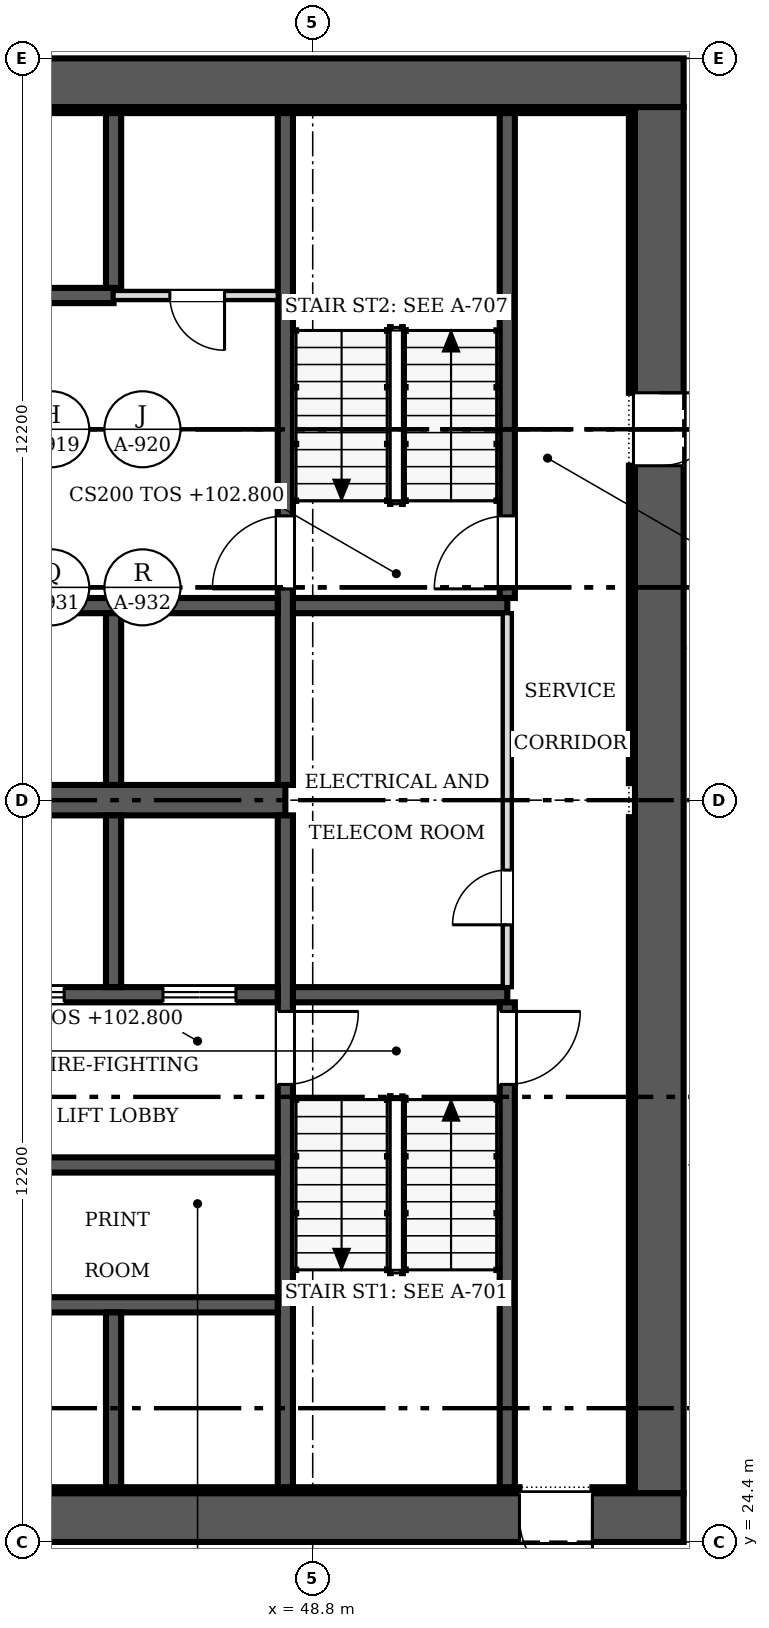
"""IFC4 building model, lengths in metres.
Left out: names, types, materials, properties, quantities, classifications, styles, units other than length and angle.
Written with IfcOpenShell. Run it as: python <this file> out.ifc"""

import sys

from ifc_helpers import new_model, si_unit, direction, frame, frame_2d, origin, place, context, subcontext, project, spatial, rectangle, extrude, source, transform, mapped, element, fill, save


model = new_model("IFC4")
c1 = context("Model", 3, precision=1e-05, world=origin(), true_north=direction((0.0, 1.0)))
c2 = subcontext(c1, "Body", "Model", "MODEL_VIEW")
j1 = project(units=[si_unit("LENGTHUNIT", "METRE"), si_unit("PLANEANGLEUNIT", "RADIAN")], contexts=[c1])
p1 = place(None, origin())
s1 = spatial("IfcSite", under=j1, at=p1, CompositionType="ELEMENT")
p2 = place(p1, origin())
s2 = spatial("IfcBuilding", under=s1, at=p2, CompositionType="ELEMENT")
p3 = place(p2, frame((0.0, 0.0, 102.8)))
s3 = spatial("IfcBuildingStorey", under=s2, at=p3, CompositionType="ELEMENT", Elevation=102.8)
p4 = place(p3, frame((54.9, 24.8, 0.0), z_axis=(0.0, 0.0, 1.0), x_axis=(-1.0, 0.0, 0.0)))
e1 = element("IfcWall", 1, at=p4, inside=s3, PredefinedType="SHEAR", context=c2, shape_type="SweptSolid", body=[
    extrude(rectangle(XDim=24.4, YDim=0.8, at=frame_2d((12.2, 0.0))), origin(), (0.0, 0.0, 1.0), 3.8),
])
m1 = source(origin(), c2, "Body", "SweptSolid", [
    extrude(rectangle(XDim=1.2, YDim=2.1, at=frame_2d((0.6, 1.05))), frame((0.0, 0.41, 0.0), z_axis=(0.0, -1.0, 0.0), x_axis=(1.0, 0.0, 0.0)), (0.0, 0.0, 1.0), 0.82),
])
p5 = place(p4, frame((1.5, 0.0, 0.0)))
e2 = element("IfcOpeningElement", 2, at=p5, cuts=e1, PredefinedType="OPENING", context=c2, shape_type="MappedRepresentation", body=[
    mapped(m1, transform((0.0, 0.0, 0.0), scale=1.0)),
])
p6 = place(p3, frame((30.5, 48.4, 0.0), z_axis=(0.0, 0.0, 1.0), x_axis=(1.0, 0.0, 0.0)))
e3 = element("IfcWall", 3, at=p6, inside=s3, PredefinedType="SHEAR", context=c2, shape_type="SweptSolid", body=[
    extrude(rectangle(XDim=24.4, YDim=0.8, at=frame_2d((12.2, 0.0))), origin(), (0.0, 0.0, 1.0), 3.8),
])
p7 = place(p3, frame((54.5, 48.0, 0.0), z_axis=(0.0, 0.0, 1.0), x_axis=(0.0, -1.0, 0.0)))
e4 = element("IfcWall", 4, at=p7, inside=s3, PredefinedType="SHEAR", context=c2, shape_type="SweptSolid", body=[
    extrude(rectangle(XDim=22.8, YDim=0.8, at=frame_2d((11.4, 0.0))), origin(), (0.0, 0.0, 1.0), 3.8),
])
p8 = place(p7, frame((4.7, 0.0, 0.0)))
e5 = element("IfcOpeningElement", 5, at=p8, cuts=e4, PredefinedType="OPENING", context=c2, shape_type="MappedRepresentation", body=[
    mapped(m1, transform((0.0, 0.0, 0.0), scale=1.0)),
])
p9 = place(p3, frame((31.3, 25.25, 0.0), z_axis=(0.0, 0.0, 1.0), x_axis=(1.0, 0.0, 0.0)))
e6 = element("IfcWall", 6, at=p9, inside=s3, PredefinedType="SOLIDWALL", context=c2, shape_type="SweptSolid", body=[
    extrude(rectangle(XDim=20.9, YDim=0.1, at=frame_2d((10.45, 0.0))), origin(), (0.0, 0.0, 1.0), 3.8),
])
p10 = place(p3, frame((53.4, 25.25, 0.0), z_axis=(0.0, 0.0, 1.0), x_axis=(1.0, 0.0, 0.0)))
e7 = element("IfcWall", 7, at=p10, inside=s3, PredefinedType="SOLIDWALL", context=c2, shape_type="SweptSolid", body=[
    extrude(rectangle(XDim=0.7, YDim=0.1, at=frame_2d((0.35, 0.0))), origin(), (0.0, 0.0, 1.0), 3.8),
])
p11 = place(p3, frame((31.3, 47.95, 0.0), z_axis=(0.0, 0.0, 1.0), x_axis=(1.0, 0.0, 0.0)))
e8 = element("IfcWall", 8, at=p11, inside=s3, PredefinedType="SOLIDWALL", context=c2, shape_type="SweptSolid", body=[
    extrude(rectangle(XDim=22.8, YDim=0.1, at=frame_2d((11.4, 0.0))), origin(), (0.0, 0.0, 1.0), 3.8),
])
p12 = place(p3, frame((54.05, 25.3, 0.0), z_axis=(0.0, 0.0, 1.0), x_axis=(0.0, 1.0, 0.0)))
e9 = element("IfcWall", 9, at=p12, inside=s3, PredefinedType="SOLIDWALL", context=c2, shape_type="SweptSolid", body=[
    extrude(rectangle(XDim=11.02, YDim=0.1, at=frame_2d((5.51, 0.0))), origin(), (0.0, 0.0, 1.0), 3.8),
])
p13 = place(p3, frame((54.05, 36.88, 0.0), z_axis=(0.0, 0.0, 1.0), x_axis=(0.0, 1.0, 0.0)))
e10 = element("IfcWall", 10, at=p13, inside=s3, PredefinedType="SOLIDWALL", context=c2, shape_type="SweptSolid", body=[
    extrude(rectangle(XDim=5.22, YDim=0.1, at=frame_2d((2.61, 0.0))), origin(), (0.0, 0.0, 1.0), 3.8),
])
p14 = place(p3, frame((54.05, 43.3, 0.0), z_axis=(0.0, 0.0, 1.0), x_axis=(0.0, 1.0, 0.0)))
e11 = element("IfcWall", 11, at=p14, inside=s3, PredefinedType="SOLIDWALL", context=c2, shape_type="SweptSolid", body=[
    extrude(rectangle(XDim=4.6, YDim=0.1, at=frame_2d((2.3, 0.0))), origin(), (0.0, 0.0, 1.0), 3.8),
])
p15 = place(p3, frame((31.4, 36.6, 0.0), z_axis=(0.0, 0.0, 1.0), x_axis=(1.0, 0.0, 0.0)))
e12 = element("IfcWall", 12, at=p15, inside=s3, PredefinedType="SHEAR", context=c2, shape_type="SweptSolid", body=[
    extrude(rectangle(XDim=16.95, YDim=0.5, at=frame_2d((8.475, 0.0))), origin(), (0.0, 0.0, 1.0), 3.8),
])
p16 = place(p3, frame((48.35, 36.35, 0.0), z_axis=(0.0, 0.0, 1.0), x_axis=(0.0, -1.0, 0.0)))
e13 = element("IfcWall", 13, at=p16, inside=s3, PredefinedType="SOLIDWALL", context=c2, shape_type="SweptSolid", body=[
    extrude(rectangle(XDim=11.05, YDim=0.25, at=frame_2d((5.525, 0.0))), origin(), (0.0, 0.0, 1.0), 3.8),
])
m2 = source(origin(), c2, "Body", "SweptSolid", [
    extrude(rectangle(XDim=1.2, YDim=2.1, at=frame_2d((0.6, 1.05))), frame((0.0, 0.135, 0.0), z_axis=(0.0, -1.0, 0.0), x_axis=(1.0, 0.0, 0.0)), (0.0, 0.0, 1.0), 0.27),
])
p17 = place(p16, frame((3.225, 0.0, 0.0)))
e14 = element("IfcOpeningElement", 14, at=p17, cuts=e13, PredefinedType="OPENING", context=c2, shape_type="MappedRepresentation", body=[
    mapped(m2, transform((0.0, 0.0, 0.0), scale=1.0)),
])
p18 = place(p3, frame((48.35, 47.9, 0.0), z_axis=(0.0, 0.0, 1.0), x_axis=(0.0, -1.0, 0.0)))
e15 = element("IfcWall", 15, at=p18, inside=s3, PredefinedType="SOLIDWALL", context=c2, shape_type="SweptSolid", body=[
    extrude(rectangle(XDim=11.05, YDim=0.25, at=frame_2d((5.525, 0.0))), origin(), (0.0, 0.0, 1.0), 3.8),
])
p19 = place(p18, frame((6.625, 0.0, 0.0)))
e16 = element("IfcOpeningElement", 16, at=p19, cuts=e15, PredefinedType="OPENING", context=c2, shape_type="MappedRepresentation", body=[
    mapped(m2, transform((0.0, 0.0, 0.0), scale=1.0)),
])
p20 = place(p3, frame((48.225, 33.4, 0.0), z_axis=(0.0, 0.0, 1.0), x_axis=(-1.0, 0.0, 0.0)))
e17 = element("IfcWall", 17, at=p20, inside=s3, PredefinedType="SOLIDWALL", context=c2, shape_type="SweptSolid", body=[
    extrude(rectangle(XDim=5.275, YDim=0.25, at=frame_2d((2.638, 0.0))), origin(), (0.0, 0.0, 1.0), 3.8),
])
p21 = place(p20, frame((3.512, 0.0, 0.0)))
e18 = element("IfcOpeningElement", 18, at=p21, cuts=e17, PredefinedType="OPENING", context=c2, shape_type="MappedRepresentation", body=[
    mapped(m2, transform((0.0, 0.0, 0.0), scale=1.0)),
])
p22 = place(p20, frame((0.688, 0.0, 0.0)))
e19 = element("IfcOpeningElement", 19, at=p22, cuts=e17, PredefinedType="OPENING", context=c2, shape_type="MappedRepresentation", body=[
    mapped(m2, transform((0.0, 0.0, 0.0), scale=1.0)),
])
p23 = place(p3, frame((48.475, 33.4, 0.0), z_axis=(0.0, 0.0, 1.0), x_axis=(1.0, 0.0, 0.0)))
e20 = element("IfcWall", 20, at=p23, inside=s3, PredefinedType="SOLIDWALL", context=c2, shape_type="SweptSolid", body=[
    extrude(rectangle(XDim=3.525, YDim=0.25, at=frame_2d((1.762, 0.0))), origin(), (0.0, 0.0, 1.0), 3.8),
])
p24 = place(p3, frame((42.95, 39.8, 0.0), z_axis=(0.0, 0.0, 1.0), x_axis=(1.0, 0.0, 0.0)))
e21 = element("IfcWall", 21, at=p24, inside=s3, PredefinedType="SOLIDWALL", context=c2, shape_type="SweptSolid", body=[
    extrude(rectangle(XDim=5.275, YDim=0.25, at=frame_2d((2.638, 0.0))), origin(), (0.0, 0.0, 1.0), 3.8),
])
p25 = place(p3, frame((48.475, 39.8, 0.0), z_axis=(0.0, 0.0, 1.0), x_axis=(1.0, 0.0, 0.0)))
e22 = element("IfcWall", 22, at=p25, inside=s3, PredefinedType="SOLIDWALL", context=c2, shape_type="SweptSolid", body=[
    extrude(rectangle(XDim=3.525, YDim=0.25, at=frame_2d((1.762, 0.0))), origin(), (0.0, 0.0, 1.0), 3.8),
])
p26 = place(p3, frame((42.95, 28.3, 0.0), z_axis=(0.0, 0.0, 1.0), x_axis=(1.0, 0.0, 0.0)))
e23 = element("IfcWall", 23, at=p26, inside=s3, PredefinedType="SOLIDWALL", context=c2, shape_type="SweptSolid", body=[
    extrude(rectangle(XDim=5.275, YDim=0.25, at=frame_2d((2.638, 0.0))), origin(), (0.0, 0.0, 1.0), 3.8),
])
p27 = place(p3, frame((42.95, 44.9, 0.0), z_axis=(0.0, 0.0, 1.0), x_axis=(1.0, 0.0, 0.0)))
e24 = element("IfcWall", 24, at=p27, inside=s3, PredefinedType="SOLIDWALL", context=c2, shape_type="SweptSolid", body=[
    extrude(rectangle(XDim=2.575, YDim=0.25, at=frame_2d((1.288, 0.0))), origin(), (0.0, 0.0, 1.0), 3.8),
])
p28 = place(p3, frame((52.0, 25.3, 0.0), z_axis=(0.0, 0.0, 1.0), x_axis=(0.0, 1.0, 0.0)))
e25 = element("IfcWall", 25, at=p28, inside=s3, PredefinedType="SOLIDWALL", context=c2, shape_type="SweptSolid", body=[
    extrude(rectangle(XDim=7.975, YDim=0.25, at=frame_2d((3.987, 0.0))), origin(), (0.0, 0.0, 1.0), 3.8),
])
p29 = place(p28, frame((6.625, 0.0, 0.0)))
e26 = element("IfcOpeningElement", 26, at=p29, cuts=e25, PredefinedType="OPENING", context=c2, shape_type="MappedRepresentation", body=[
    mapped(m2, transform((0.0, 0.0, 0.0), scale=1.0)),
])
p30 = place(p3, frame((52.0, 39.925, 0.0), z_axis=(0.0, 0.0, 1.0), x_axis=(0.0, 1.0, 0.0)))
e27 = element("IfcWall", 27, at=p30, inside=s3, PredefinedType="SOLIDWALL", context=c2, shape_type="SweptSolid", body=[
    extrude(rectangle(XDim=7.975, YDim=0.25, at=frame_2d((3.987, 0.0))), origin(), (0.0, 0.0, 1.0), 3.8),
])
p31 = place(p30, frame((0.15, 0.0, 0.0)))
e28 = element("IfcOpeningElement", 28, at=p31, cuts=e27, PredefinedType="OPENING", context=c2, shape_type="MappedRepresentation", body=[
    mapped(m2, transform((0.0, 0.0, 0.0), scale=1.0)),
])
p32 = place(p3, frame((45.525, 33.525, 0.0), z_axis=(0.0, 0.0, 1.0), x_axis=(0.0, 1.0, 0.0)))
e29 = element("IfcWall", 29, at=p32, inside=s3, PredefinedType="SOLIDWALL", context=c2, shape_type="SweptSolid", body=[
    extrude(rectangle(XDim=2.825, YDim=0.25, at=frame_2d((1.413, 0.0))), origin(), (0.0, 0.0, 1.0), 3.8),
])
p33 = place(p3, frame((45.525, 36.85, 0.0), z_axis=(0.0, 0.0, 1.0), x_axis=(0.0, 1.0, 0.0)))
e30 = element("IfcWall", 30, at=p33, inside=s3, PredefinedType="SOLIDWALL", context=c2, shape_type="SweptSolid", body=[
    extrude(rectangle(XDim=2.825, YDim=0.25, at=frame_2d((1.413, 0.0))), origin(), (0.0, 0.0, 1.0), 3.8),
])
p34 = place(p3, frame((42.95, 30.6, 0.0), z_axis=(0.0, 0.0, 1.0), x_axis=(1.0, 0.0, 0.0)))
e31 = element("IfcWall", 31, at=p34, inside=s3, PredefinedType="SOLIDWALL", context=c2, shape_type="SweptSolid", body=[
    extrude(rectangle(XDim=5.275, YDim=0.25, at=frame_2d((2.638, 0.0))), origin(), (0.0, 0.0, 1.0), 3.8),
])
for number, where, z_axis, x_axis in (
    (32, (45.525, 25.3, 0.0), (0.0, 0.0, 1.0), (0.0, 1.0, 0.0)),
    (33, (45.525, 45.025, 0.0), (0.0, 0.0, 1.0), (0.0, 1.0, 0.0)),
):
    element("IfcWall", number, at=place(p3, frame(where, z_axis=z_axis, x_axis=x_axis)), inside=s3, PredefinedType="SOLIDWALL", context=c2, shape_type="SweptSolid", body=[
        extrude(rectangle(XDim=2.875, YDim=0.25, at=frame_2d((1.438, 0.0))), origin(), (0.0, 0.0, 1.0), 3.8),
    ])
p35 = place(p3, frame((52.0, 33.525, 0.0), z_axis=(0.0, 0.0, 1.0), x_axis=(0.0, 1.0, 0.0)))
e34 = element("IfcWall", 34, at=p35, inside=s3, PredefinedType="PARTITIONING", context=c2, shape_type="SweptSolid", body=[
    extrude(rectangle(XDim=6.15, YDim=0.15, at=frame_2d((3.075, 0.0))), origin(), (0.0, 0.0, 1.0), 3.55),
])
m3 = source(origin(), c2, "Body", "SweptSolid", [
    extrude(rectangle(XDim=0.9, YDim=2.1, at=frame_2d((0.45, 1.05))), frame((0.0, 0.085, 0.0), z_axis=(0.0, -1.0, 0.0), x_axis=(1.0, 0.0, 0.0)), (0.0, 0.0, 1.0), 0.17),
])
p36 = place(p35, frame((1.025, 0.0, 0.0)))
e35 = element("IfcOpeningElement", 35, at=p36, cuts=e34, PredefinedType="OPENING", context=c2, shape_type="MappedRepresentation", body=[
    mapped(m3, transform((0.0, 0.0, 0.0), scale=1.0)),
])
p37 = place(p3, frame((45.525, 44.9, 0.0), z_axis=(0.0, 0.0, 1.0), x_axis=(1.0, 0.0, 0.0)))
e36 = element("IfcWall", 36, at=p37, inside=s3, PredefinedType="PARTITIONING", context=c2, shape_type="SweptSolid", body=[
    extrude(rectangle(XDim=2.7, YDim=0.15, at=frame_2d((1.35, 0.0))), origin(), (0.0, 0.0, 1.0), 3.55),
])
p38 = place(p37, frame((0.925, 0.0, 0.0)))
e37 = element("IfcOpeningElement", 37, at=p38, cuts=e36, PredefinedType="OPENING", context=c2, shape_type="MappedRepresentation", body=[
    mapped(m3, transform((0.0, 0.0, 0.0), scale=1.0)),
])
m4 = source(origin(), c2, "Body", "SweptSolid", [
    extrude(rectangle(XDim=1.2, YDim=2.1, at=frame_2d((0.6, 1.05))), frame((0.0, 0.025, 0.0), z_axis=(0.0, -1.0, 0.0), x_axis=(1.0, 0.0, 0.0)), (0.0, 0.0, 1.0), 0.05),
])
p39 = place(p5, origin())
e38 = element("IfcDoor", 38, at=p39, inside=s3, OperationType="SINGLE_SWING_LEFT", PredefinedType="DOOR", context=c2, shape_type="MappedRepresentation", body=[
    mapped(m4, transform((0.0, 0.0, 0.0), scale=1.0)),
])
fill(e2, e38)
p40 = place(p8, origin())
e39 = element("IfcDoor", 39, at=p40, inside=s3, OperationType="SINGLE_SWING_LEFT", PredefinedType="DOOR", context=c2, shape_type="MappedRepresentation", body=[
    mapped(m4, transform((0.0, 0.0, 0.0), scale=1.0)),
])
fill(e5, e39)
p41 = place(p17, origin())
e40 = element("IfcDoor", 40, at=p41, inside=s3, OperationType="SINGLE_SWING_LEFT", PredefinedType="DOOR", context=c2, shape_type="MappedRepresentation", body=[
    mapped(m4, transform((0.0, 0.0, 0.0), scale=1.0)),
])
fill(e14, e40)
p42 = place(p19, origin())
e41 = element("IfcDoor", 41, at=p42, inside=s3, OperationType="SINGLE_SWING_RIGHT", PredefinedType="DOOR", context=c2, shape_type="MappedRepresentation", body=[
    mapped(m4, transform((0.0, 0.0, 0.0), scale=1.0)),
])
fill(e16, e41)
p43 = place(p21, origin())
e42 = element("IfcDoor", 42, at=p43, inside=s3, OperationType="DOUBLE_DOOR_SLIDING", PredefinedType="DOOR", context=c2, shape_type="MappedRepresentation", body=[
    mapped(m4, transform((0.0, 0.0, 0.0), scale=1.0)),
])
fill(e18, e42)
p44 = place(p22, origin())
e43 = element("IfcDoor", 43, at=p44, inside=s3, OperationType="DOUBLE_DOOR_SLIDING", PredefinedType="DOOR", context=c2, shape_type="MappedRepresentation", body=[
    mapped(m4, transform((0.0, 0.0, 0.0), scale=1.0)),
])
fill(e19, e43)
p45 = place(p29, origin())
e44 = element("IfcDoor", 44, at=p45, inside=s3, OperationType="SINGLE_SWING_RIGHT", PredefinedType="DOOR", context=c2, shape_type="MappedRepresentation", body=[
    mapped(m4, transform((0.0, 0.0, 0.0), scale=1.0)),
])
fill(e26, e44)
p46 = place(p31, origin())
e45 = element("IfcDoor", 45, at=p46, inside=s3, OperationType="SINGLE_SWING_LEFT", PredefinedType="DOOR", context=c2, shape_type="MappedRepresentation", body=[
    mapped(m4, transform((0.0, 0.0, 0.0), scale=1.0)),
])
fill(e28, e45)
m5 = source(origin(), c2, "Body", "SweptSolid", [
    extrude(rectangle(XDim=0.9, YDim=2.1, at=frame_2d((0.45, 1.05))), frame((0.0, 0.025, 0.0), z_axis=(0.0, -1.0, 0.0), x_axis=(1.0, 0.0, 0.0)), (0.0, 0.0, 1.0), 0.05),
])
p47 = place(p36, origin())
e46 = element("IfcDoor", 46, at=p47, inside=s3, OperationType="SINGLE_SWING_LEFT", PredefinedType="DOOR", context=c2, shape_type="MappedRepresentation", body=[
    mapped(m5, transform((0.0, 0.0, 0.0), scale=1.0)),
])
fill(e35, e46)
p48 = place(p38, origin())
e47 = element("IfcDoor", 47, at=p48, inside=s3, OperationType="SINGLE_SWING_RIGHT", PredefinedType="DOOR", context=c2, shape_type="MappedRepresentation", body=[
    mapped(m5, transform((0.0, 0.0, 0.0), scale=1.0)),
])
fill(e37, e47)
save(model, sys.argv[1])
